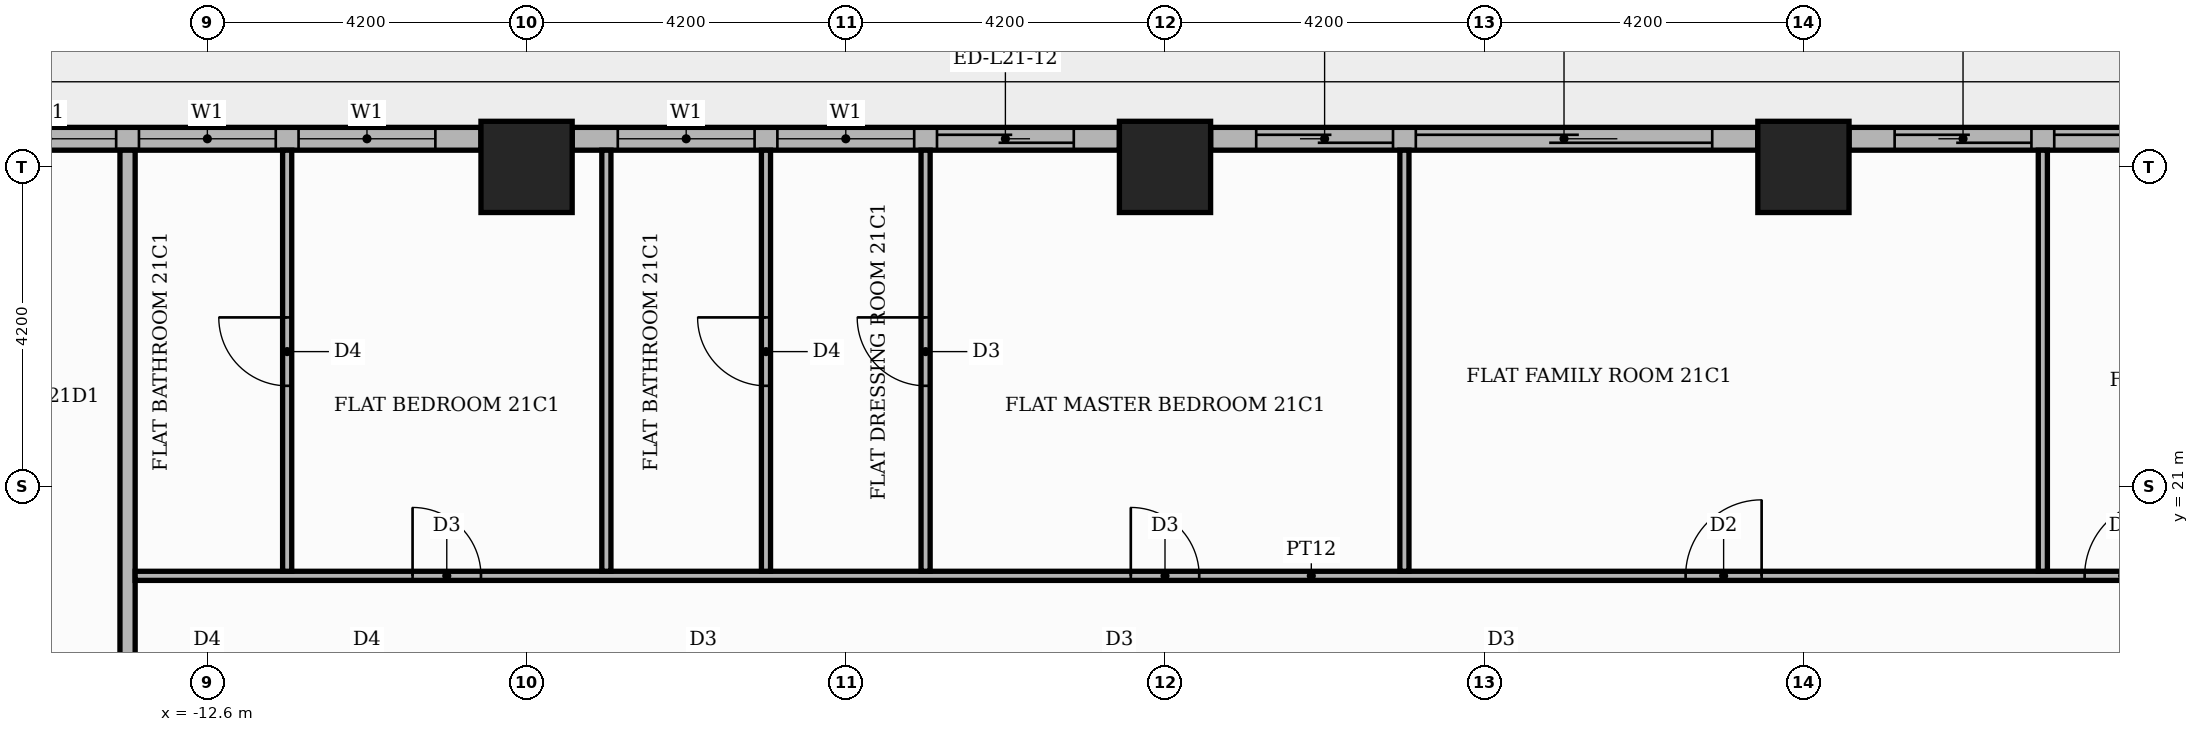
"""IFC4 building model, lengths in metres.
Left out: names, types, materials, properties, quantities, classifications, styles, units other than length and angle.
Written with IfcOpenShell. Run it as: python <this file> out.ifc"""

import sys

from ifc_helpers import new_model, si_unit, direction, frame, frame_2d, origin, origin_2d, place, context, subcontext, project, spatial, rectangle, extrude, element, fill, save


model = new_model("IFC4")
c1 = context("Model", 3, precision=1e-05, world=origin(), true_north=direction((0.0, 1.0)))
c2 = subcontext(c1, "Body", "Model", "MODEL_VIEW")
j1 = project(units=[si_unit("LENGTHUNIT", "METRE"), si_unit("PLANEANGLEUNIT", "RADIAN")], contexts=[c1])
p1 = place(None, origin())
s1 = spatial("IfcSite", under=j1, at=p1, CompositionType="ELEMENT")
p2 = place(p1, origin())
s2 = spatial("IfcBuilding", under=s1, at=p2, CompositionType="ELEMENT")
p3 = place(p2, frame((0.0, 0.0, 90.9)))
s3 = spatial("IfcBuildingStorey", under=s2, at=p3, CompositionType="ELEMENT", Elevation=90.9)
for number, where, z_axis, x_axis in (
    (1, (0.0, 25.2, 0.0), (0.0, 0.0, 1.0), (1.0, 0.0, 0.0)),
    (2, (-8.4, 25.2, 0.0), (0.0, 0.0, 1.0), (1.0, 0.0, 0.0)),
    (3, (8.4, 25.2, 0.0), (0.0, 0.0, 1.0), (1.0, 0.0, 0.0)),
):
    element("IfcColumn", number, at=place(p3, frame(where, z_axis=z_axis, x_axis=x_axis)), inside=s3, PredefinedType="COLUMN", context=c2, shape_type="SweptSolid", body=[
        extrude(rectangle(XDim=1.2, YDim=1.2, at=origin_2d()), origin(), (0.0, 0.0, 1.0), 3.9),
    ])
p4 = place(p3, frame((16.2, 25.57, 0.0), z_axis=(0.0, 0.0, 1.0), x_axis=(-1.0, 0.0, 0.0)))
e4 = element("IfcWall", 4, at=p4, inside=s3, PredefinedType="STANDARD", context=c2, shape_type="SweptSolid", body=[
    extrude(rectangle(XDim=7.2, YDim=0.3, at=frame_2d((3.6, 0.0))), origin(), (0.0, 0.0, 1.0), 3.48),
])
p5 = place(p4, frame((0.6, 0.0, 0.0)))
e5 = element("IfcOpeningElement", 5, at=p5, cuts=e4, PredefinedType="OPENING", context=c2, shape_type="SweptSolid", body=[
    extrude(rectangle(XDim=3.9, YDim=2.4, at=frame_2d((1.95, 1.2))), frame((0.0, 0.16, 0.0), z_axis=(0.0, -1.0, 0.0), x_axis=(1.0, 0.0, 0.0)), (0.0, 0.0, 1.0), 0.32),
])
p6 = place(p4, frame((4.8, 0.0, 0.0)))
e6 = element("IfcOpeningElement", 6, at=p6, cuts=e4, PredefinedType="OPENING", context=c2, shape_type="SweptSolid", body=[
    extrude(rectangle(XDim=1.8, YDim=2.4, at=frame_2d((0.9, 1.2))), frame((0.0, 0.16, 0.0), z_axis=(0.0, -1.0, 0.0), x_axis=(1.0, 0.0, 0.0)), (0.0, 0.0, 1.0), 0.32),
])
p7 = place(p3, frame((7.8, 25.57, 0.0), z_axis=(0.0, 0.0, 1.0), x_axis=(-1.0, 0.0, 0.0)))
e7 = element("IfcWall", 7, at=p7, inside=s3, PredefinedType="STANDARD", context=c2, shape_type="SweptSolid", body=[
    extrude(rectangle(XDim=7.2, YDim=0.3, at=frame_2d((3.6, 0.0))), origin(), (0.0, 0.0, 1.0), 3.48),
])
p8 = place(p7, frame((0.6, 0.0, 0.0)))
e8 = element("IfcOpeningElement", 8, at=p8, cuts=e7, PredefinedType="OPENING", context=c2, shape_type="SweptSolid", body=[
    extrude(rectangle(XDim=3.9, YDim=2.4, at=frame_2d((1.95, 1.2))), frame((0.0, 0.16, 0.0), z_axis=(0.0, -1.0, 0.0), x_axis=(1.0, 0.0, 0.0)), (0.0, 0.0, 1.0), 0.32),
])
p9 = place(p7, frame((4.8, 0.0, 0.0)))
e9 = element("IfcOpeningElement", 9, at=p9, cuts=e7, PredefinedType="OPENING", context=c2, shape_type="SweptSolid", body=[
    extrude(rectangle(XDim=1.8, YDim=2.4, at=frame_2d((0.9, 1.2))), frame((0.0, 0.16, 0.0), z_axis=(0.0, -1.0, 0.0), x_axis=(1.0, 0.0, 0.0)), (0.0, 0.0, 1.0), 0.32),
])
p10 = place(p3, frame((-0.6, 25.57, 0.0), z_axis=(0.0, 0.0, 1.0), x_axis=(-1.0, 0.0, 0.0)))
e10 = element("IfcWall", 10, at=p10, inside=s3, PredefinedType="STANDARD", context=c2, shape_type="SweptSolid", body=[
    extrude(rectangle(XDim=7.2, YDim=0.3, at=frame_2d((3.6, 0.0))), origin(), (0.0, 0.0, 1.0), 3.48),
])
p11 = place(p10, frame((0.6, 0.0, 0.0)))
e11 = element("IfcOpeningElement", 11, at=p11, cuts=e10, PredefinedType="OPENING", context=c2, shape_type="SweptSolid", body=[
    extrude(rectangle(XDim=1.8, YDim=2.4, at=frame_2d((0.9, 1.2))), frame((0.0, 0.16, 0.0), z_axis=(0.0, -1.0, 0.0), x_axis=(1.0, 0.0, 0.0)), (0.0, 0.0, 1.0), 0.32),
])
p12 = place(p10, frame((2.7, 0.0, 0.9)))
e12 = element("IfcOpeningElement", 12, at=p12, cuts=e10, PredefinedType="OPENING", context=c2, shape_type="SweptSolid", body=[
    extrude(rectangle(XDim=1.8, YDim=2.1, at=frame_2d((0.9, 1.05))), frame((0.0, 0.16, 0.0), z_axis=(0.0, -1.0, 0.0), x_axis=(1.0, 0.0, 0.0)), (0.0, 0.0, 1.0), 0.32),
])
p13 = place(p10, frame((4.8, 0.0, 0.9)))
e13 = element("IfcOpeningElement", 13, at=p13, cuts=e10, PredefinedType="OPENING", context=c2, shape_type="SweptSolid", body=[
    extrude(rectangle(XDim=1.8, YDim=2.1, at=frame_2d((0.9, 1.05))), frame((0.0, 0.16, 0.0), z_axis=(0.0, -1.0, 0.0), x_axis=(1.0, 0.0, 0.0)), (0.0, 0.0, 1.0), 0.32),
])
p14 = place(p3, frame((-9.0, 25.57, 0.0), z_axis=(0.0, 0.0, 1.0), x_axis=(-1.0, 0.0, 0.0)))
e14 = element("IfcWall", 14, at=p14, inside=s3, PredefinedType="STANDARD", context=c2, shape_type="SweptSolid", body=[
    extrude(rectangle(XDim=7.2, YDim=0.3, at=frame_2d((3.6, 0.0))), origin(), (0.0, 0.0, 1.0), 3.48),
])
p15 = place(p14, frame((0.6, 0.0, 0.9)))
e15 = element("IfcOpeningElement", 15, at=p15, cuts=e14, PredefinedType="OPENING", context=c2, shape_type="SweptSolid", body=[
    extrude(rectangle(XDim=1.8, YDim=2.1, at=frame_2d((0.9, 1.05))), frame((0.0, 0.16, 0.0), z_axis=(0.0, -1.0, 0.0), x_axis=(1.0, 0.0, 0.0)), (0.0, 0.0, 1.0), 0.32),
])
p16 = place(p14, frame((2.7, 0.0, 0.9)))
e16 = element("IfcOpeningElement", 16, at=p16, cuts=e14, PredefinedType="OPENING", context=c2, shape_type="SweptSolid", body=[
    extrude(rectangle(XDim=1.8, YDim=2.1, at=frame_2d((0.9, 1.05))), frame((0.0, 0.16, 0.0), z_axis=(0.0, -1.0, 0.0), x_axis=(1.0, 0.0, 0.0)), (0.0, 0.0, 1.0), 0.32),
])
p17 = place(p14, frame((4.8, 0.0, 0.9)))
e17 = element("IfcOpeningElement", 17, at=p17, cuts=e14, PredefinedType="OPENING", context=c2, shape_type="SweptSolid", body=[
    extrude(rectangle(XDim=1.8, YDim=2.1, at=frame_2d((0.9, 1.05))), frame((0.0, 0.16, 0.0), z_axis=(0.0, -1.0, 0.0), x_axis=(1.0, 0.0, 0.0)), (0.0, 0.0, 1.0), 0.32),
])
p18 = place(p3, frame((-13.65, 13.75, 0.0), z_axis=(0.0, 0.0, 1.0), x_axis=(0.0, 1.0, 0.0)))
e18 = element("IfcWall", 18, at=p18, inside=s3, PredefinedType="PARTITIONING", context=c2, shape_type="SweptSolid", body=[
    extrude(rectangle(XDim=11.67, YDim=0.2, at=frame_2d((5.835, 0.0))), origin(), (0.0, 0.0, 1.0), 3.48),
])
p19 = place(p3, frame((-13.55, 19.82, 0.0), z_axis=(0.0, 0.0, 1.0), x_axis=(1.0, 0.0, 0.0)))
e19 = element("IfcWall", 19, at=p19, inside=s3, PredefinedType="PARTITIONING", context=c2, shape_type="SweptSolid", body=[
    extrude(rectangle(XDim=30.95, YDim=0.12, at=frame_2d((15.475, 0.0))), origin(), (0.0, 0.0, 1.0), 3.48),
])
p20 = place(p19, frame((25.65, 0.0, 0.0)))
e20 = element("IfcOpeningElement", 20, at=p20, cuts=e19, PredefinedType="OPENING", context=c2, shape_type="SweptSolid", body=[
    extrude(rectangle(XDim=1.0, YDim=2.1, at=frame_2d((0.5, 1.05))), frame((0.0, 0.07, 0.0), z_axis=(0.0, -1.0, 0.0), x_axis=(1.0, 0.0, 0.0)), (0.0, 0.0, 1.0), 0.14),
])
p21 = place(p19, frame((20.4, 0.0, 0.0)))
e21 = element("IfcOpeningElement", 21, at=p21, cuts=e19, PredefinedType="OPENING", context=c2, shape_type="SweptSolid", body=[
    extrude(rectangle(XDim=1.0, YDim=2.1, at=frame_2d((0.5, 1.05))), frame((0.0, 0.07, 0.0), z_axis=(0.0, -1.0, 0.0), x_axis=(1.0, 0.0, 0.0)), (0.0, 0.0, 1.0), 0.14),
])
p22 = place(p19, frame((13.1, 0.0, 0.0)))
e22 = element("IfcOpeningElement", 22, at=p22, cuts=e19, PredefinedType="OPENING", context=c2, shape_type="SweptSolid", body=[
    extrude(rectangle(XDim=0.9, YDim=2.1, at=frame_2d((0.45, 1.05))), frame((0.0, 0.07, 0.0), z_axis=(0.0, -1.0, 0.0), x_axis=(1.0, 0.0, 0.0)), (0.0, 0.0, 1.0), 0.14),
])
p23 = place(p19, frame((3.65, 0.0, 0.0)))
e23 = element("IfcOpeningElement", 23, at=p23, cuts=e19, PredefinedType="OPENING", context=c2, shape_type="SweptSolid", body=[
    extrude(rectangle(XDim=0.9, YDim=2.1, at=frame_2d((0.45, 1.05))), frame((0.0, 0.07, 0.0), z_axis=(0.0, -1.0, 0.0), x_axis=(1.0, 0.0, 0.0)), (0.0, 0.0, 1.0), 0.14),
])
p24 = place(p3, frame((-11.55, 19.88, 0.0), z_axis=(0.0, 0.0, 1.0), x_axis=(0.0, 1.0, 0.0)))
e24 = element("IfcWall", 24, at=p24, inside=s3, PredefinedType="PARTITIONING", context=c2, shape_type="SweptSolid", body=[
    extrude(rectangle(XDim=5.54, YDim=0.12, at=frame_2d((2.77, 0.0))), origin(), (0.0, 0.0, 1.0), 3.48),
])
p25 = place(p24, frame((2.44, 0.0, 0.0)))
e25 = element("IfcOpeningElement", 25, at=p25, cuts=e24, PredefinedType="OPENING", context=c2, shape_type="SweptSolid", body=[
    extrude(rectangle(XDim=0.9, YDim=2.1, at=frame_2d((0.45, 1.05))), frame((0.0, 0.07, 0.0), z_axis=(0.0, -1.0, 0.0), x_axis=(1.0, 0.0, 0.0)), (0.0, 0.0, 1.0), 0.14),
])
p26 = place(p3, frame((-7.35, 19.88, 0.0), z_axis=(0.0, 0.0, 1.0), x_axis=(0.0, 1.0, 0.0)))
e26 = element("IfcWall", 26, at=p26, inside=s3, PredefinedType="PARTITIONING", context=c2, shape_type="SweptSolid", body=[
    extrude(rectangle(XDim=5.54, YDim=0.12, at=frame_2d((2.77, 0.0))), origin(), (0.0, 0.0, 1.0), 3.48),
])
p27 = place(p3, frame((-5.25, 19.88, 0.0), z_axis=(0.0, 0.0, 1.0), x_axis=(0.0, 1.0, 0.0)))
e27 = element("IfcWall", 27, at=p27, inside=s3, PredefinedType="PARTITIONING", context=c2, shape_type="SweptSolid", body=[
    extrude(rectangle(XDim=5.54, YDim=0.12, at=frame_2d((2.77, 0.0))), origin(), (0.0, 0.0, 1.0), 3.48),
])
p28 = place(p27, frame((2.44, 0.0, 0.0)))
e28 = element("IfcOpeningElement", 28, at=p28, cuts=e27, PredefinedType="OPENING", context=c2, shape_type="SweptSolid", body=[
    extrude(rectangle(XDim=0.9, YDim=2.1, at=frame_2d((0.45, 1.05))), frame((0.0, 0.07, 0.0), z_axis=(0.0, -1.0, 0.0), x_axis=(1.0, 0.0, 0.0)), (0.0, 0.0, 1.0), 0.14),
])
p29 = place(p3, frame((-3.15, 19.88, 0.0), z_axis=(0.0, 0.0, 1.0), x_axis=(0.0, 1.0, 0.0)))
e29 = element("IfcWall", 29, at=p29, inside=s3, PredefinedType="PARTITIONING", context=c2, shape_type="SweptSolid", body=[
    extrude(rectangle(XDim=5.54, YDim=0.12, at=frame_2d((2.77, 0.0))), origin(), (0.0, 0.0, 1.0), 3.48),
])
p30 = place(p29, frame((2.44, 0.0, 0.0)))
e30 = element("IfcOpeningElement", 30, at=p30, cuts=e29, PredefinedType="OPENING", context=c2, shape_type="SweptSolid", body=[
    extrude(rectangle(XDim=0.9, YDim=2.1, at=frame_2d((0.45, 1.05))), frame((0.0, 0.07, 0.0), z_axis=(0.0, -1.0, 0.0), x_axis=(1.0, 0.0, 0.0)), (0.0, 0.0, 1.0), 0.14),
])
for number, where, z_axis, x_axis in (
    (31, (3.15, 19.88, 0.0), (0.0, 0.0, 1.0), (0.0, 1.0, 0.0)),
    (32, (11.55, 19.88, 0.0), (0.0, 0.0, 1.0), (0.0, 1.0, 0.0)),
):
    element("IfcWall", number, at=place(p3, frame(where, z_axis=z_axis, x_axis=x_axis)), inside=s3, PredefinedType="PARTITIONING", context=c2, shape_type="SweptSolid", body=[
        extrude(rectangle(XDim=5.54, YDim=0.12, at=frame_2d((2.77, 0.0))), origin(), (0.0, 0.0, 1.0), 3.48),
    ])
p31 = place(p5, origin())
e33 = element("IfcDoor", 33, at=p31, inside=s3, OperationType="SLIDING_TO_LEFT", PredefinedType="DOOR", context=c2, shape_type="SweptSolid", body=[
    extrude(rectangle(XDim=3.9, YDim=2.4, at=frame_2d((1.95, 1.2))), frame((0.0, 0.025, 0.0), z_axis=(0.0, -1.0, 0.0), x_axis=(1.0, 0.0, 0.0)), (0.0, 0.0, 1.0), 0.05),
])
fill(e5, e33)
p32 = place(p6, origin())
e34 = element("IfcDoor", 34, at=p32, inside=s3, OperationType="SLIDING_TO_RIGHT", PredefinedType="DOOR", context=c2, shape_type="SweptSolid", body=[
    extrude(rectangle(XDim=1.8, YDim=2.4, at=frame_2d((0.9, 1.2))), frame((0.0, 0.025, 0.0), z_axis=(0.0, -1.0, 0.0), x_axis=(1.0, 0.0, 0.0)), (0.0, 0.0, 1.0), 0.05),
])
fill(e6, e34)
p33 = place(p8, origin())
e35 = element("IfcDoor", 35, at=p33, inside=s3, OperationType="SLIDING_TO_LEFT", PredefinedType="DOOR", context=c2, shape_type="SweptSolid", body=[
    extrude(rectangle(XDim=3.9, YDim=2.4, at=frame_2d((1.95, 1.2))), frame((0.0, 0.025, 0.0), z_axis=(0.0, -1.0, 0.0), x_axis=(1.0, 0.0, 0.0)), (0.0, 0.0, 1.0), 0.05),
])
fill(e8, e35)
p34 = place(p9, origin())
e36 = element("IfcDoor", 36, at=p34, inside=s3, OperationType="SLIDING_TO_RIGHT", PredefinedType="DOOR", context=c2, shape_type="SweptSolid", body=[
    extrude(rectangle(XDim=1.8, YDim=2.4, at=frame_2d((0.9, 1.2))), frame((0.0, 0.025, 0.0), z_axis=(0.0, -1.0, 0.0), x_axis=(1.0, 0.0, 0.0)), (0.0, 0.0, 1.0), 0.05),
])
fill(e9, e36)
p35 = place(p11, origin())
e37 = element("IfcDoor", 37, at=p35, inside=s3, OperationType="SLIDING_TO_LEFT", PredefinedType="DOOR", context=c2, shape_type="SweptSolid", body=[
    extrude(rectangle(XDim=1.8, YDim=2.4, at=frame_2d((0.9, 1.2))), frame((0.0, 0.025, 0.0), z_axis=(0.0, -1.0, 0.0), x_axis=(1.0, 0.0, 0.0)), (0.0, 0.0, 1.0), 0.05),
])
fill(e11, e37)
p36 = place(p12, origin())
e38 = element("IfcWindow", 38, at=p36, inside=s3, PartitioningType="SINGLE_PANEL", PredefinedType="WINDOW", context=c2, shape_type="SweptSolid", body=[
    extrude(rectangle(XDim=1.8, YDim=2.1, at=frame_2d((0.9, 1.05))), frame((0.0, 0.03, 0.0), z_axis=(0.0, -1.0, 0.0), x_axis=(1.0, 0.0, 0.0)), (0.0, 0.0, 1.0), 0.06),
])
fill(e12, e38)
p37 = place(p13, origin())
e39 = element("IfcWindow", 39, at=p37, inside=s3, PartitioningType="SINGLE_PANEL", PredefinedType="WINDOW", context=c2, shape_type="SweptSolid", body=[
    extrude(rectangle(XDim=1.8, YDim=2.1, at=frame_2d((0.9, 1.05))), frame((0.0, 0.03, 0.0), z_axis=(0.0, -1.0, 0.0), x_axis=(1.0, 0.0, 0.0)), (0.0, 0.0, 1.0), 0.06),
])
fill(e13, e39)
p38 = place(p15, origin())
e40 = element("IfcWindow", 40, at=p38, inside=s3, PartitioningType="SINGLE_PANEL", PredefinedType="WINDOW", context=c2, shape_type="SweptSolid", body=[
    extrude(rectangle(XDim=1.8, YDim=2.1, at=frame_2d((0.9, 1.05))), frame((0.0, 0.03, 0.0), z_axis=(0.0, -1.0, 0.0), x_axis=(1.0, 0.0, 0.0)), (0.0, 0.0, 1.0), 0.06),
])
fill(e15, e40)
p39 = place(p16, origin())
e41 = element("IfcWindow", 41, at=p39, inside=s3, PartitioningType="SINGLE_PANEL", PredefinedType="WINDOW", context=c2, shape_type="SweptSolid", body=[
    extrude(rectangle(XDim=1.8, YDim=2.1, at=frame_2d((0.9, 1.05))), frame((0.0, 0.03, 0.0), z_axis=(0.0, -1.0, 0.0), x_axis=(1.0, 0.0, 0.0)), (0.0, 0.0, 1.0), 0.06),
])
fill(e16, e41)
p40 = place(p17, origin())
e42 = element("IfcWindow", 42, at=p40, inside=s3, PartitioningType="SINGLE_PANEL", PredefinedType="WINDOW", context=c2, shape_type="SweptSolid", body=[
    extrude(rectangle(XDim=1.8, YDim=2.1, at=frame_2d((0.9, 1.05))), frame((0.0, 0.03, 0.0), z_axis=(0.0, -1.0, 0.0), x_axis=(1.0, 0.0, 0.0)), (0.0, 0.0, 1.0), 0.06),
])
fill(e17, e42)
p41 = place(p20, origin())
e43 = element("IfcDoor", 43, at=p41, inside=s3, OperationType="SINGLE_SWING_RIGHT", PredefinedType="DOOR", context=c2, shape_type="SweptSolid", body=[
    extrude(rectangle(XDim=1.0, YDim=2.1, at=frame_2d((0.5, 1.05))), frame((0.0, 0.025, 0.0), z_axis=(0.0, -1.0, 0.0), x_axis=(1.0, 0.0, 0.0)), (0.0, 0.0, 1.0), 0.05),
])
fill(e20, e43)
p42 = place(p21, origin())
e44 = element("IfcDoor", 44, at=p42, inside=s3, OperationType="SINGLE_SWING_RIGHT", PredefinedType="DOOR", context=c2, shape_type="SweptSolid", body=[
    extrude(rectangle(XDim=1.0, YDim=2.1, at=frame_2d((0.5, 1.05))), frame((0.0, 0.025, 0.0), z_axis=(0.0, -1.0, 0.0), x_axis=(1.0, 0.0, 0.0)), (0.0, 0.0, 1.0), 0.05),
])
fill(e21, e44)
p43 = place(p22, origin())
e45 = element("IfcDoor", 45, at=p43, inside=s3, OperationType="SINGLE_SWING_LEFT", PredefinedType="DOOR", context=c2, shape_type="SweptSolid", body=[
    extrude(rectangle(XDim=0.9, YDim=2.1, at=frame_2d((0.45, 1.05))), frame((0.0, 0.025, 0.0), z_axis=(0.0, -1.0, 0.0), x_axis=(1.0, 0.0, 0.0)), (0.0, 0.0, 1.0), 0.05),
])
fill(e22, e45)
p44 = place(p30, origin())
e46 = element("IfcDoor", 46, at=p44, inside=s3, OperationType="SINGLE_SWING_RIGHT", PredefinedType="DOOR", context=c2, shape_type="SweptSolid", body=[
    extrude(rectangle(XDim=0.9, YDim=2.1, at=frame_2d((0.45, 1.05))), frame((0.0, 0.025, 0.0), z_axis=(0.0, -1.0, 0.0), x_axis=(1.0, 0.0, 0.0)), (0.0, 0.0, 1.0), 0.05),
])
fill(e30, e46)
p45 = place(p28, origin())
e47 = element("IfcDoor", 47, at=p45, inside=s3, OperationType="SINGLE_SWING_RIGHT", PredefinedType="DOOR", context=c2, shape_type="SweptSolid", body=[
    extrude(rectangle(XDim=0.9, YDim=2.1, at=frame_2d((0.45, 1.05))), frame((0.0, 0.025, 0.0), z_axis=(0.0, -1.0, 0.0), x_axis=(1.0, 0.0, 0.0)), (0.0, 0.0, 1.0), 0.05),
])
fill(e28, e47)
p46 = place(p23, origin())
e48 = element("IfcDoor", 48, at=p46, inside=s3, OperationType="SINGLE_SWING_LEFT", PredefinedType="DOOR", context=c2, shape_type="SweptSolid", body=[
    extrude(rectangle(XDim=0.9, YDim=2.1, at=frame_2d((0.45, 1.05))), frame((0.0, 0.025, 0.0), z_axis=(0.0, -1.0, 0.0), x_axis=(1.0, 0.0, 0.0)), (0.0, 0.0, 1.0), 0.05),
])
fill(e23, e48)
p47 = place(p25, origin())
e49 = element("IfcDoor", 49, at=p47, inside=s3, OperationType="SINGLE_SWING_RIGHT", PredefinedType="DOOR", context=c2, shape_type="SweptSolid", body=[
    extrude(rectangle(XDim=0.9, YDim=2.1, at=frame_2d((0.45, 1.05))), frame((0.0, 0.025, 0.0), z_axis=(0.0, -1.0, 0.0), x_axis=(1.0, 0.0, 0.0)), (0.0, 0.0, 1.0), 0.05),
])
fill(e25, e49)
save(model, sys.argv[1])
